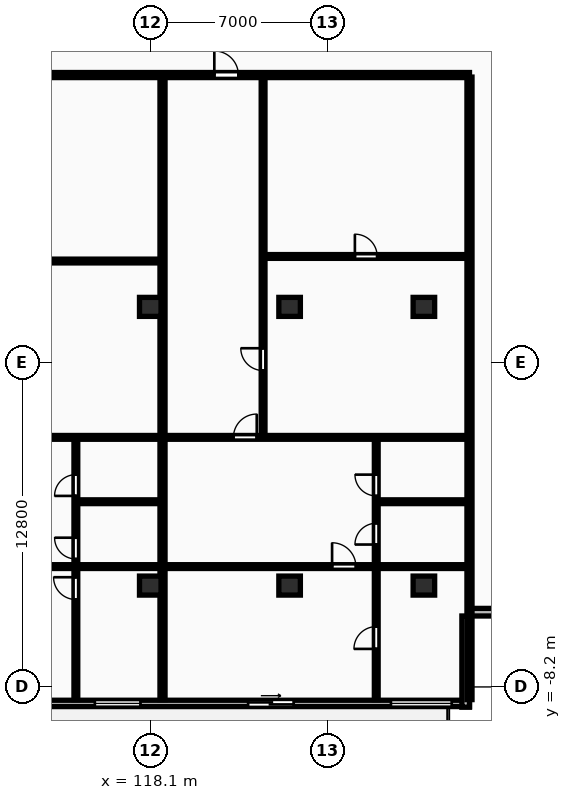
"""IFC4 building model, lengths in metres.
Left out: names, types, materials, properties, quantities, classifications, styles, units other than length and angle.
Written with IfcOpenShell. Run it as: python <this file> out.ifc"""

import sys

from ifc_helpers import new_model, si_unit, direction, frame, frame_2d, origin, origin_2d, place, context, subcontext, project, spatial, rectangle, extrude, element, fill, save


model = new_model("IFC4")
c1 = context("Model", 3, precision=1e-05, world=origin(), true_north=direction((0.0, 1.0)))
c2 = subcontext(c1, "Body", "Model", "MODEL_VIEW")
j1 = project(units=[si_unit("LENGTHUNIT", "METRE"), si_unit("PLANEANGLEUNIT", "RADIAN")], contexts=[c1])
p1 = place(None, origin())
s1 = spatial("IfcSite", under=j1, at=p1, CompositionType="ELEMENT")
p2 = place(p1, origin())
s2 = spatial("IfcBuilding", under=s1, at=p2, CompositionType="ELEMENT")
p3 = place(p2, frame((0.0, 0.0, 106.8)))
s3 = spatial("IfcBuildingStorey", under=s2, at=p3, CompositionType="ELEMENT", Elevation=106.8)
for number, where, z_axis, x_axis in (
    (1, (118.1, -4.2, 0.0), (0.0, 0.0, 1.0), (1.0, 0.0, 0.0)),
    (2, (118.1, 6.8, 0.0), (0.0, 0.0, 1.0), (1.0, 0.0, 0.0)),
    (3, (123.6, -4.2, 0.0), (0.0, 0.0, 1.0), (1.0, 0.0, 0.0)),
    (4, (123.6, 6.8, 0.0), (0.0, 0.0, 1.0), (1.0, 0.0, 0.0)),
    (5, (128.9, -4.2, 0.0), (0.0, 0.0, 1.0), (1.0, 0.0, 0.0)),
    (6, (128.9, 6.8, 0.0), (0.0, 0.0, 1.0), (1.0, 0.0, 0.0)),
):
    element("IfcColumn", number, at=place(p3, frame(where, z_axis=z_axis, x_axis=x_axis)), inside=s3, PredefinedType="COLUMN", context=c2, shape_type="SweptSolid", body=[
        extrude(rectangle(XDim=0.85, YDim=0.75, at=origin_2d()), origin(), (0.0, 0.0, 1.0), 3.25),
    ])
p4 = place(p3, frame((72.7, -8.85, 0.0), z_axis=(0.0, 0.0, 1.0), x_axis=(1.0, 0.0, 0.0)))
e7 = element("IfcWall", 7, at=p4, inside=s3, PredefinedType="STANDARD", context=c2, shape_type="SweptSolid", body=[
    extrude(rectangle(XDim=58.0, YDim=0.25, at=frame_2d((29.0, 0.0))), origin(), (0.0, 0.0, 1.0), 2.97),
])
p5 = place(p4, frame((3.358, 0.0, 0.0)))
e8 = element("IfcOpeningElement", 8, at=p5, cuts=e7, PredefinedType="OPENING", context=c2, shape_type="SweptSolid", body=[
    extrude(rectangle(XDim=1.8, YDim=2.2, at=frame_2d((0.9, 1.1))), frame((0.0, 0.135, 0.0), z_axis=(0.0, -1.0, 0.0), x_axis=(1.0, 0.0, 0.0)), (0.0, 0.0, 1.0), 0.27),
])
p6 = place(p4, frame((12.755, 0.0, 0.85)))
e9 = element("IfcOpeningElement", 9, at=p6, cuts=e7, PredefinedType="OPENING", context=c2, shape_type="SweptSolid", body=[
    extrude(rectangle(XDim=2.4, YDim=1.9, at=frame_2d((1.2, 0.95))), frame((0.0, 0.135, 0.0), z_axis=(0.0, -1.0, 0.0), x_axis=(1.0, 0.0, 0.0)), (0.0, 0.0, 1.0), 0.27),
])
p7 = place(p4, frame((23.617, 0.0, 0.0)))
e10 = element("IfcOpeningElement", 10, at=p7, cuts=e7, PredefinedType="OPENING", context=c2, shape_type="SweptSolid", body=[
    extrude(rectangle(XDim=1.8, YDim=2.2, at=frame_2d((0.9, 1.1))), frame((0.0, 0.135, 0.0), z_axis=(0.0, -1.0, 0.0), x_axis=(1.0, 0.0, 0.0)), (0.0, 0.0, 1.0), 0.27),
])
p8 = place(p4, frame((29.705, 0.0, 0.85)))
e11 = element("IfcOpeningElement", 11, at=p8, cuts=e7, PredefinedType="OPENING", context=c2, shape_type="SweptSolid", body=[
    extrude(rectangle(XDim=1.8, YDim=1.8, at=frame_2d((0.9, 0.9))), frame((0.0, 0.135, 0.0), z_axis=(0.0, -1.0, 0.0), x_axis=(1.0, 0.0, 0.0)), (0.0, 0.0, 1.0), 0.27),
])
p9 = place(p4, frame((36.417, 0.0, 0.0)))
e12 = element("IfcOpeningElement", 12, at=p9, cuts=e7, PredefinedType="OPENING", context=c2, shape_type="SweptSolid", body=[
    extrude(rectangle(XDim=1.8, YDim=2.2, at=frame_2d((0.9, 1.1))), frame((0.0, 0.135, 0.0), z_axis=(0.0, -1.0, 0.0), x_axis=(1.0, 0.0, 0.0)), (0.0, 0.0, 1.0), 0.27),
])
p10 = place(p4, frame((43.213, 0.0, 0.85)))
e13 = element("IfcOpeningElement", 13, at=p10, cuts=e7, PredefinedType="OPENING", context=c2, shape_type="SweptSolid", body=[
    extrude(rectangle(XDim=1.8, YDim=1.8, at=frame_2d((0.9, 0.9))), frame((0.0, 0.135, 0.0), z_axis=(0.0, -1.0, 0.0), x_axis=(1.0, 0.0, 0.0)), (0.0, 0.0, 1.0), 0.27),
])
p11 = place(p4, frame((49.262, 0.0, 0.0)))
e14 = element("IfcOpeningElement", 14, at=p11, cuts=e7, PredefinedType="OPENING", context=c2, shape_type="SweptSolid", body=[
    extrude(rectangle(XDim=1.8, YDim=2.2, at=frame_2d((0.9, 1.1))), frame((0.0, 0.135, 0.0), z_axis=(0.0, -1.0, 0.0), x_axis=(1.0, 0.0, 0.0)), (0.0, 0.0, 1.0), 0.27),
])
p12 = place(p4, frame((54.9, 0.0, 0.85)))
e15 = element("IfcOpeningElement", 15, at=p12, cuts=e7, PredefinedType="OPENING", context=c2, shape_type="SweptSolid", body=[
    extrude(rectangle(XDim=2.4, YDim=1.9, at=frame_2d((1.2, 0.95))), frame((0.0, 0.135, 0.0), z_axis=(0.0, -1.0, 0.0), x_axis=(1.0, 0.0, 0.0)), (0.0, 0.0, 1.0), 0.27),
])
for number, where, z_axis, x_axis in (
    (16, (130.55, -9.0, 0.0), (0.0, 0.0, 1.0), (0.0, 1.0, 0.0)),
    (17, (130.7, -5.25, 0.0), (0.0, 0.0, 1.0), (1.0, 0.0, 0.0)),
):
    element("IfcWall", number, at=place(p3, frame(where, z_axis=z_axis, x_axis=x_axis)), inside=s3, PredefinedType="STANDARD", context=c2, shape_type="SweptSolid", body=[
        extrude(rectangle(XDim=3.6, YDim=0.3, at=frame_2d((1.8, 0.0))), origin(), (0.0, 0.0, 1.0), 2.97),
    ])
for number, where, z_axis, x_axis in (
    (18, (130.7, -8.7, 0.0), (0.0, 0.0, 1.0), (0.0, 1.0, 0.0)),
    (19, (118.583, -8.7, 0.0), (0.0, 0.0, 1.0), (0.0, 1.0, 0.0)),
):
    element("IfcWall", number, at=place(p3, frame(where, z_axis=z_axis, x_axis=x_axis)), inside=s3, PredefinedType="PARTITIONING", context=c2, shape_type="SweptSolid", body=[
        extrude(rectangle(XDim=24.57, YDim=0.2, at=frame_2d((12.285, 0.0))), origin(), (0.0, 0.0, 1.0), 2.97),
    ])
p13 = place(p3, frame((108.78, 8.61, 0.0), z_axis=(0.0, 0.0, 1.0), x_axis=(1.0, 0.0, 0.0)))
e20 = element("IfcWall", 20, at=p13, inside=s3, PredefinedType="PARTITIONING", context=c2, shape_type="SweptSolid", body=[
    extrude(rectangle(XDim=9.723, YDim=0.15, at=frame_2d((4.862, 0.0))), origin(), (0.0, 0.0, 1.0), 2.97),
])
p14 = place(p13, frame((3.792, 0.0, 0.0)))
e21 = element("IfcOpeningElement", 21, at=p14, cuts=e20, PredefinedType="OPENING", context=c2, shape_type="SweptSolid", body=[
    extrude(rectangle(XDim=0.88, YDim=2.06, at=frame_2d((0.44, 1.03))), frame((0.0, 0.085, 0.0), z_axis=(0.0, -1.0, 0.0), x_axis=(1.0, 0.0, 0.0)), (0.0, 0.0, 1.0), 0.17),
])
p15 = place(p3, frame((115.223, -0.89, 0.0), z_axis=(0.0, 0.0, 1.0), x_axis=(1.0, 0.0, 0.0)))
e22 = element("IfcWall", 22, at=p15, inside=s3, PredefinedType="PARTITIONING", context=c2, shape_type="SweptSolid", body=[
    extrude(rectangle(XDim=3.28, YDim=0.15, at=frame_2d((1.64, 0.0))), origin(), (0.0, 0.0, 1.0), 2.97),
])
p16 = place(p3, frame((115.163, -8.7, 0.0), z_axis=(0.0, 0.0, 1.0), x_axis=(0.0, 1.0, 0.0)))
e23 = element("IfcWall", 23, at=p16, inside=s3, PredefinedType="PARTITIONING", context=c2, shape_type="SweptSolid", body=[
    extrude(rectangle(XDim=10.31, YDim=0.15, at=frame_2d((5.155, 0.0))), origin(), (0.0, 0.0, 1.0), 2.97),
])
p17 = place(p16, frame((5.55, 0.0, 0.0)))
e24 = element("IfcOpeningElement", 24, at=p17, cuts=e23, PredefinedType="OPENING", context=c2, shape_type="SweptSolid", body=[
    extrude(rectangle(XDim=0.84, YDim=2.04, at=frame_2d((0.42, 1.02))), frame((0.0, 0.085, 0.0), z_axis=(0.0, -1.0, 0.0), x_axis=(1.0, 0.0, 0.0)), (0.0, 0.0, 1.0), 0.17),
])
p18 = place(p16, frame((8.04, 0.0, 0.0)))
e25 = element("IfcOpeningElement", 25, at=p18, cuts=e23, PredefinedType="OPENING", context=c2, shape_type="SweptSolid", body=[
    extrude(rectangle(XDim=0.84, YDim=2.04, at=frame_2d((0.42, 1.02))), frame((0.0, 0.085, 0.0), z_axis=(0.0, -1.0, 0.0), x_axis=(1.0, 0.0, 0.0)), (0.0, 0.0, 1.0), 0.17),
])
p19 = place(p16, frame((3.95, 0.0, 0.0)))
e26 = element("IfcOpeningElement", 26, at=p19, cuts=e23, PredefinedType="OPENING", context=c2, shape_type="SweptSolid", body=[
    extrude(rectangle(XDim=0.88, YDim=2.06, at=frame_2d((0.44, 1.03))), frame((0.0, 0.085, 0.0), z_axis=(0.0, -1.0, 0.0), x_axis=(1.0, 0.0, 0.0)), (0.0, 0.0, 1.0), 0.17),
])
p20 = place(p3, frame((104.83, 1.65, 0.0), z_axis=(0.0, 0.0, 1.0), x_axis=(1.0, 0.0, 0.0)))
e27 = element("IfcWall", 27, at=p20, inside=s3, PredefinedType="PARTITIONING", context=c2, shape_type="SweptSolid", body=[
    extrude(rectangle(XDim=13.673, YDim=0.15, at=frame_2d((6.837, 0.0))), origin(), (0.0, 0.0, 1.0), 2.97),
])
p21 = place(p20, frame((2.72, 0.0, 0.0)))
e28 = element("IfcOpeningElement", 28, at=p21, cuts=e27, PredefinedType="OPENING", context=c2, shape_type="SweptSolid", body=[
    extrude(rectangle(XDim=0.92, YDim=2.08, at=frame_2d((0.46, 1.04))), frame((0.0, 0.085, 0.0), z_axis=(0.0, -1.0, 0.0), x_axis=(1.0, 0.0, 0.0)), (0.0, 0.0, 1.0), 0.17),
])
p22 = place(p3, frame((104.83, -3.45, 0.0), z_axis=(0.0, 0.0, 1.0), x_axis=(1.0, 0.0, 0.0)))
e29 = element("IfcWall", 29, at=p22, inside=s3, PredefinedType="PARTITIONING", context=c2, shape_type="SweptSolid", body=[
    extrude(rectangle(XDim=13.673, YDim=0.15, at=frame_2d((6.837, 0.0))), origin(), (0.0, 0.0, 1.0), 2.97),
])
p23 = place(p22, frame((6.367, 0.0, 0.0)))
e30 = element("IfcOpeningElement", 30, at=p23, cuts=e29, PredefinedType="OPENING", context=c2, shape_type="SweptSolid", body=[
    extrude(rectangle(XDim=0.94, YDim=2.1, at=frame_2d((0.47, 1.05))), frame((0.0, 0.085, 0.0), z_axis=(0.0, -1.0, 0.0), x_axis=(1.0, 0.0, 0.0)), (0.0, 0.0, 1.0), 0.17),
])
p24 = place(p3, frame((122.613, 8.79, 0.0), z_axis=(0.0, 0.0, 1.0), x_axis=(1.0, 0.0, 0.0)))
e31 = element("IfcWall", 31, at=p24, inside=s3, PredefinedType="PARTITIONING", context=c2, shape_type="SweptSolid", body=[
    extrude(rectangle(XDim=8.007, YDim=0.15, at=frame_2d((4.003, 0.0))), origin(), (0.0, 0.0, 1.0), 2.97),
])
p25 = place(p24, frame((3.563, 0.0, 0.0)))
e32 = element("IfcOpeningElement", 32, at=p25, cuts=e31, PredefinedType="OPENING", context=c2, shape_type="SweptSolid", body=[
    extrude(rectangle(XDim=0.88, YDim=2.06, at=frame_2d((0.44, 1.03))), frame((0.0, 0.085, 0.0), z_axis=(0.0, -1.0, 0.0), x_axis=(1.0, 0.0, 0.0)), (0.0, 0.0, 1.0), 0.17),
])
p26 = place(p3, frame((122.553, 1.69, 0.0), z_axis=(0.0, 0.0, 1.0), x_axis=(0.0, 1.0, 0.0)))
e33 = element("IfcWall", 33, at=p26, inside=s3, PredefinedType="PARTITIONING", context=c2, shape_type="SweptSolid", body=[
    extrude(rectangle(XDim=14.2, YDim=0.15, at=frame_2d((7.1, 0.0))), origin(), (0.0, 0.0, 1.0), 2.97),
])
p27 = place(p26, frame((2.598, 0.0, 0.0)))
e34 = element("IfcOpeningElement", 34, at=p27, cuts=e33, PredefinedType="OPENING", context=c2, shape_type="SweptSolid", body=[
    extrude(rectangle(XDim=0.88, YDim=2.06, at=frame_2d((0.44, 1.03))), frame((0.0, 0.085, 0.0), z_axis=(0.0, -1.0, 0.0), x_axis=(1.0, 0.0, 0.0)), (0.0, 0.0, 1.0), 0.17),
])
p28 = place(p3, frame((127.08, -0.89, 0.0), z_axis=(0.0, 0.0, 1.0), x_axis=(1.0, 0.0, 0.0)))
e35 = element("IfcWall", 35, at=p28, inside=s3, PredefinedType="PARTITIONING", context=c2, shape_type="SweptSolid", body=[
    extrude(rectangle(XDim=3.54, YDim=0.15, at=frame_2d((1.77, 0.0))), origin(), (0.0, 0.0, 1.0), 2.97),
])
p29 = place(p3, frame((127.02, -8.7, 0.0), z_axis=(0.0, 0.0, 1.0), x_axis=(0.0, 1.0, 0.0)))
e36 = element("IfcWall", 36, at=p29, inside=s3, PredefinedType="PARTITIONING", context=c2, shape_type="SweptSolid", body=[
    extrude(rectangle(XDim=10.31, YDim=0.15, at=frame_2d((5.155, 0.0))), origin(), (0.0, 0.0, 1.0), 2.97),
])
p30 = place(p29, frame((6.12, 0.0, 0.0)))
e37 = element("IfcOpeningElement", 37, at=p30, cuts=e36, PredefinedType="OPENING", context=c2, shape_type="SweptSolid", body=[
    extrude(rectangle(XDim=0.84, YDim=2.04, at=frame_2d((0.42, 1.02))), frame((0.0, 0.085, 0.0), z_axis=(0.0, -1.0, 0.0), x_axis=(1.0, 0.0, 0.0)), (0.0, 0.0, 1.0), 0.17),
])
p31 = place(p29, frame((8.04, 0.0, 0.0)))
e38 = element("IfcOpeningElement", 38, at=p31, cuts=e36, PredefinedType="OPENING", context=c2, shape_type="SweptSolid", body=[
    extrude(rectangle(XDim=0.84, YDim=2.04, at=frame_2d((0.42, 1.02))), frame((0.0, 0.085, 0.0), z_axis=(0.0, -1.0, 0.0), x_axis=(1.0, 0.0, 0.0)), (0.0, 0.0, 1.0), 0.17),
])
p32 = place(p29, frame((2.001, 0.0, 0.0)))
e39 = element("IfcOpeningElement", 39, at=p32, cuts=e36, PredefinedType="OPENING", context=c2, shape_type="SweptSolid", body=[
    extrude(rectangle(XDim=0.88, YDim=2.06, at=frame_2d((0.44, 1.03))), frame((0.0, 0.085, 0.0), z_axis=(0.0, -1.0, 0.0), x_axis=(1.0, 0.0, 0.0)), (0.0, 0.0, 1.0), 0.17),
])
p33 = place(p3, frame((118.663, 1.65, 0.0), z_axis=(0.0, 0.0, 1.0), x_axis=(1.0, 0.0, 0.0)))
e40 = element("IfcWall", 40, at=p33, inside=s3, PredefinedType="PARTITIONING", context=c2, shape_type="SweptSolid", body=[
    extrude(rectangle(XDim=11.957, YDim=0.15, at=frame_2d((5.979, 0.0))), origin(), (0.0, 0.0, 1.0), 2.97),
])
p34 = place(p33, frame((2.72, 0.0, 0.0)))
e41 = element("IfcOpeningElement", 41, at=p34, cuts=e40, PredefinedType="OPENING", context=c2, shape_type="SweptSolid", body=[
    extrude(rectangle(XDim=0.92, YDim=2.08, at=frame_2d((0.46, 1.04))), frame((0.0, 0.085, 0.0), z_axis=(0.0, -1.0, 0.0), x_axis=(1.0, 0.0, 0.0)), (0.0, 0.0, 1.0), 0.17),
])
p35 = place(p3, frame((118.663, -3.45, 0.0), z_axis=(0.0, 0.0, 1.0), x_axis=(1.0, 0.0, 0.0)))
e42 = element("IfcWall", 42, at=p35, inside=s3, PredefinedType="PARTITIONING", context=c2, shape_type="SweptSolid", body=[
    extrude(rectangle(XDim=11.957, YDim=0.15, at=frame_2d((5.979, 0.0))), origin(), (0.0, 0.0, 1.0), 2.97),
])
p36 = place(p35, frame((6.613, 0.0, 0.0)))
e43 = element("IfcOpeningElement", 43, at=p36, cuts=e42, PredefinedType="OPENING", context=c2, shape_type="SweptSolid", body=[
    extrude(rectangle(XDim=0.94, YDim=2.1, at=frame_2d((0.47, 1.05))), frame((0.0, 0.085, 0.0), z_axis=(0.0, -1.0, 0.0), x_axis=(1.0, 0.0, 0.0)), (0.0, 0.0, 1.0), 0.17),
])
p37 = place(p3, frame((72.7, 15.95, 0.0), z_axis=(0.0, 0.0, 1.0), x_axis=(1.0, 0.0, 0.0)))
e44 = element("IfcWall", 44, at=p37, inside=s3, PredefinedType="PARTITIONING", context=c2, shape_type="SweptSolid", body=[
    extrude(rectangle(XDim=58.0, YDim=0.2, at=frame_2d((29.0, 0.0))), origin(), (0.0, 0.0, 1.0), 2.97),
])
p38 = place(p37, frame((6.373, 0.0, 0.0)))
e45 = element("IfcOpeningElement", 45, at=p38, cuts=e44, PredefinedType="OPENING", context=c2, shape_type="SweptSolid", body=[
    extrude(rectangle(XDim=1.22, YDim=2.18, at=frame_2d((0.61, 1.09))), frame((0.0, 0.11, 0.0), z_axis=(0.0, -1.0, 0.0), x_axis=(1.0, 0.0, 0.0)), (0.0, 0.0, 1.0), 0.22),
])
p39 = place(p37, frame((21.678, 0.0, 0.0)))
e46 = element("IfcOpeningElement", 46, at=p39, cuts=e44, PredefinedType="OPENING", context=c2, shape_type="SweptSolid", body=[
    extrude(rectangle(XDim=0.95, YDim=2.15, at=frame_2d((0.475, 1.075))), frame((0.0, 0.11, 0.0), z_axis=(0.0, -1.0, 0.0), x_axis=(1.0, 0.0, 0.0)), (0.0, 0.0, 1.0), 0.22),
])
p40 = place(p37, frame((33.812, 0.0, 0.0)))
e47 = element("IfcOpeningElement", 47, at=p40, cuts=e44, PredefinedType="OPENING", context=c2, shape_type="SweptSolid", body=[
    extrude(rectangle(XDim=0.95, YDim=2.15, at=frame_2d((0.475, 1.075))), frame((0.0, 0.11, 0.0), z_axis=(0.0, -1.0, 0.0), x_axis=(1.0, 0.0, 0.0)), (0.0, 0.0, 1.0), 0.22),
])
p41 = place(p37, frame((47.928, 0.0, 0.0)))
e48 = element("IfcOpeningElement", 48, at=p41, cuts=e44, PredefinedType="OPENING", context=c2, shape_type="SweptSolid", body=[
    extrude(rectangle(XDim=0.95, YDim=2.15, at=frame_2d((0.475, 1.075))), frame((0.0, 0.11, 0.0), z_axis=(0.0, -1.0, 0.0), x_axis=(1.0, 0.0, 0.0)), (0.0, 0.0, 1.0), 0.22),
])
p42 = place(p10, origin())
e49 = element("IfcWindow", 49, at=p42, inside=s3, PartitioningType="SINGLE_PANEL", PredefinedType="WINDOW", context=c2, shape_type="SweptSolid", body=[
    extrude(rectangle(XDim=1.8, YDim=1.8, at=frame_2d((0.9, 0.9))), frame((0.0, 0.03, 0.0), z_axis=(0.0, -1.0, 0.0), x_axis=(1.0, 0.0, 0.0)), (0.0, 0.0, 1.0), 0.06),
])
fill(e13, e49)
p43 = place(p11, origin())
e50 = element("IfcDoor", 50, at=p43, inside=s3, OperationType="SLIDING_TO_RIGHT", PredefinedType="DOOR", context=c2, shape_type="SweptSolid", body=[
    extrude(rectangle(XDim=1.8, YDim=2.2, at=frame_2d((0.9, 1.1))), frame((0.0, 0.025, 0.0), z_axis=(0.0, -1.0, 0.0), x_axis=(1.0, 0.0, 0.0)), (0.0, 0.0, 1.0), 0.05),
])
fill(e14, e50)
p44 = place(p12, origin())
e51 = element("IfcWindow", 51, at=p44, inside=s3, PartitioningType="DOUBLE_PANEL_VERTICAL", PredefinedType="WINDOW", context=c2, shape_type="SweptSolid", body=[
    extrude(rectangle(XDim=2.4, YDim=1.9, at=frame_2d((1.2, 0.95))), frame((0.0, 0.03, 0.0), z_axis=(0.0, -1.0, 0.0), x_axis=(1.0, 0.0, 0.0)), (0.0, 0.0, 1.0), 0.06),
])
fill(e15, e51)
p45 = place(p17, origin())
e52 = element("IfcDoor", 52, at=p45, inside=s3, OperationType="SINGLE_SWING_RIGHT", PredefinedType="DOOR", context=c2, shape_type="SweptSolid", body=[
    extrude(rectangle(XDim=0.84, YDim=2.04, at=frame_2d((0.42, 1.02))), frame((0.0, 0.025, 0.0), z_axis=(0.0, -1.0, 0.0), x_axis=(1.0, 0.0, 0.0)), (0.0, 0.0, 1.0), 0.05),
])
fill(e24, e52)
p46 = place(p18, origin())
e53 = element("IfcDoor", 53, at=p46, inside=s3, OperationType="SINGLE_SWING_LEFT", PredefinedType="DOOR", context=c2, shape_type="SweptSolid", body=[
    extrude(rectangle(XDim=0.84, YDim=2.04, at=frame_2d((0.42, 1.02))), frame((0.0, 0.025, 0.0), z_axis=(0.0, -1.0, 0.0), x_axis=(1.0, 0.0, 0.0)), (0.0, 0.0, 1.0), 0.05),
])
fill(e25, e53)
p47 = place(p19, origin())
e54 = element("IfcDoor", 54, at=p47, inside=s3, OperationType="SINGLE_SWING_RIGHT", PredefinedType="DOOR", context=c2, shape_type="SweptSolid", body=[
    extrude(rectangle(XDim=0.88, YDim=2.06, at=frame_2d((0.44, 1.03))), frame((0.0, 0.025, 0.0), z_axis=(0.0, -1.0, 0.0), x_axis=(1.0, 0.0, 0.0)), (0.0, 0.0, 1.0), 0.05),
])
fill(e26, e54)
p48 = place(p25, origin())
e55 = element("IfcDoor", 55, at=p48, inside=s3, OperationType="SINGLE_SWING_LEFT", PredefinedType="DOOR", context=c2, shape_type="SweptSolid", body=[
    extrude(rectangle(XDim=0.88, YDim=2.06, at=frame_2d((0.44, 1.03))), frame((0.0, 0.025, 0.0), z_axis=(0.0, -1.0, 0.0), x_axis=(1.0, 0.0, 0.0)), (0.0, 0.0, 1.0), 0.05),
])
fill(e32, e55)
p49 = place(p27, origin())
e56 = element("IfcDoor", 56, at=p49, inside=s3, OperationType="SINGLE_SWING_RIGHT", PredefinedType="DOOR", context=c2, shape_type="SweptSolid", body=[
    extrude(rectangle(XDim=0.88, YDim=2.06, at=frame_2d((0.44, 1.03))), frame((0.0, 0.025, 0.0), z_axis=(0.0, -1.0, 0.0), x_axis=(1.0, 0.0, 0.0)), (0.0, 0.0, 1.0), 0.05),
])
fill(e34, e56)
p50 = place(p30, origin())
e57 = element("IfcDoor", 57, at=p50, inside=s3, OperationType="SINGLE_SWING_LEFT", PredefinedType="DOOR", context=c2, shape_type="SweptSolid", body=[
    extrude(rectangle(XDim=0.84, YDim=2.04, at=frame_2d((0.42, 1.02))), frame((0.0, 0.025, 0.0), z_axis=(0.0, -1.0, 0.0), x_axis=(1.0, 0.0, 0.0)), (0.0, 0.0, 1.0), 0.05),
])
fill(e37, e57)
p51 = place(p31, origin())
e58 = element("IfcDoor", 58, at=p51, inside=s3, OperationType="SINGLE_SWING_RIGHT", PredefinedType="DOOR", context=c2, shape_type="SweptSolid", body=[
    extrude(rectangle(XDim=0.84, YDim=2.04, at=frame_2d((0.42, 1.02))), frame((0.0, 0.025, 0.0), z_axis=(0.0, -1.0, 0.0), x_axis=(1.0, 0.0, 0.0)), (0.0, 0.0, 1.0), 0.05),
])
fill(e38, e58)
p52 = place(p32, origin())
e59 = element("IfcDoor", 59, at=p52, inside=s3, OperationType="SINGLE_SWING_LEFT", PredefinedType="DOOR", context=c2, shape_type="SweptSolid", body=[
    extrude(rectangle(XDim=0.88, YDim=2.06, at=frame_2d((0.44, 1.03))), frame((0.0, 0.025, 0.0), z_axis=(0.0, -1.0, 0.0), x_axis=(1.0, 0.0, 0.0)), (0.0, 0.0, 1.0), 0.05),
])
fill(e39, e59)
p53 = place(p34, origin())
e60 = element("IfcDoor", 60, at=p53, inside=s3, OperationType="SINGLE_SWING_RIGHT", PredefinedType="DOOR", context=c2, shape_type="SweptSolid", body=[
    extrude(rectangle(XDim=0.92, YDim=2.08, at=frame_2d((0.46, 1.04))), frame((0.0, 0.025, 0.0), z_axis=(0.0, -1.0, 0.0), x_axis=(1.0, 0.0, 0.0)), (0.0, 0.0, 1.0), 0.05),
])
fill(e41, e60)
p54 = place(p36, origin())
e61 = element("IfcDoor", 61, at=p54, inside=s3, OperationType="SINGLE_SWING_LEFT", PredefinedType="DOOR", context=c2, shape_type="SweptSolid", body=[
    extrude(rectangle(XDim=0.94, YDim=2.1, at=frame_2d((0.47, 1.05))), frame((0.0, 0.025, 0.0), z_axis=(0.0, -1.0, 0.0), x_axis=(1.0, 0.0, 0.0)), (0.0, 0.0, 1.0), 0.05),
])
fill(e43, e61)
p55 = place(p41, origin())
e62 = element("IfcDoor", 62, at=p55, inside=s3, OperationType="SINGLE_SWING_LEFT", PredefinedType="DOOR", context=c2, shape_type="SweptSolid", body=[
    extrude(rectangle(XDim=0.95, YDim=2.15, at=frame_2d((0.475, 1.075))), frame((0.0, 0.025, 0.0), z_axis=(0.0, -1.0, 0.0), x_axis=(1.0, 0.0, 0.0)), (0.0, 0.0, 1.0), 0.05),
])
fill(e48, e62)
save(model, sys.argv[1])
